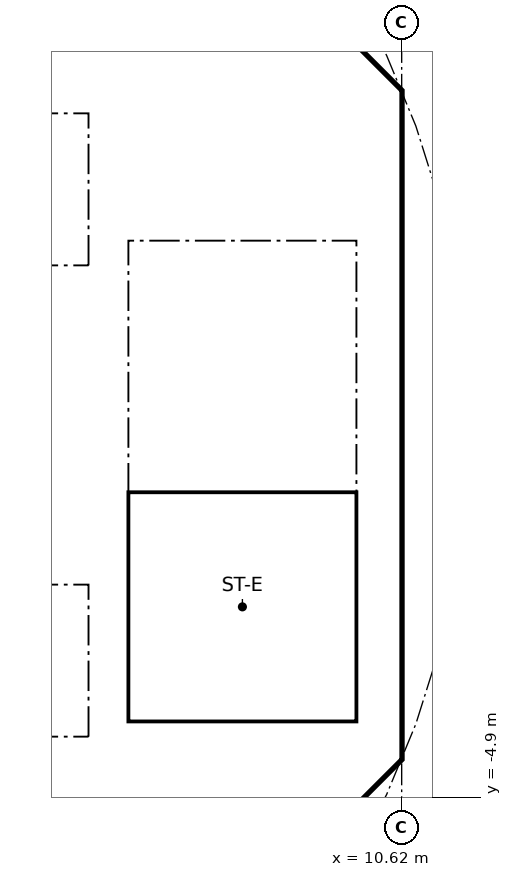
"""IFC4 building model, lengths in metres.
Left out: names, types, materials, properties, quantities, classifications, styles, units other than length and angle.
Written with IfcOpenShell. Run it as: python <this file> out.ifc"""

import sys

from ifc_helpers import new_model, si_unit, direction, frame, frame_2d, origin, place, context, subcontext, project, spatial, polyline, rectangle, outline, extrude, element, fill, save


model = new_model("IFC4")
c1 = context("Model", 3, precision=1e-05, world=origin(), true_north=direction((0.0, 1.0)))
c2 = subcontext(c1, "Body", "Model", "MODEL_VIEW")
j1 = project(units=[si_unit("LENGTHUNIT", "METRE"), si_unit("PLANEANGLEUNIT", "RADIAN")], contexts=[c1])
p1 = place(None, origin())
s1 = spatial("IfcSite", under=j1, at=p1, CompositionType="ELEMENT")
p2 = place(p1, origin())
s2 = spatial("IfcBuilding", under=s1, at=p2, CompositionType="ELEMENT")
p3 = place(p2, frame((0.0, 0.0, 320.4)))
s3 = spatial("IfcBuildingStorey", under=s2, at=p3, CompositionType="ELEMENT", Elevation=320.4)
p4 = place(p3, frame((9.988, 4.613, 0.0), z_axis=(0.0, 0.0, 1.0), x_axis=(-0.707106781187, 0.707106781187, 0.0)))
e1 = element("IfcWall", 1, at=p4, inside=s3, PredefinedType="SHEAR", context=c2, shape_type="SweptSolid", body=[
    extrude(rectangle(XDim=7.602, YDim=0.6, at=frame_2d((3.801, 0.0))), origin(), (0.0, 0.0, 1.0), 4.2),
])
p5 = place(p4, frame((3.201, 0.0, 0.0)))
e2 = element("IfcOpeningElement", 2, at=p5, cuts=e1, PredefinedType="OPENING", context=c2, shape_type="SweptSolid", body=[
    extrude(rectangle(XDim=1.2, YDim=2.1, at=frame_2d((0.6, 1.05))), frame((0.0, 0.31, 0.0), z_axis=(0.0, -1.0, 0.0), x_axis=(1.0, 0.0, 0.0)), (0.0, 0.0, 1.0), 0.62),
])
p6 = place(p3, frame((4.613, -9.988, 0.0), z_axis=(0.0, 0.0, 1.0), x_axis=(0.707106781187, 0.707106781187, 0.0)))
e3 = element("IfcWall", 3, at=p6, inside=s3, PredefinedType="SHEAR", context=c2, shape_type="SweptSolid", body=[
    extrude(rectangle(XDim=7.602, YDim=0.6, at=frame_2d((3.801, 0.0))), origin(), (0.0, 0.0, 1.0), 4.2),
])
p7 = place(p6, frame((3.201, 0.0, 0.0)))
e4 = element("IfcOpeningElement", 4, at=p7, cuts=e3, PredefinedType="OPENING", context=c2, shape_type="SweptSolid", body=[
    extrude(rectangle(XDim=1.2, YDim=2.1, at=frame_2d((0.6, 1.05))), frame((0.0, 0.31, 0.0), z_axis=(0.0, -1.0, 0.0), x_axis=(1.0, 0.0, 0.0)), (0.0, 0.0, 1.0), 0.62),
])
p8 = place(p3, frame((-6.7, 2.0, 0.0), z_axis=(0.0, 0.0, 1.0), x_axis=(1.0, 0.0, 0.0)))
e5 = element("IfcWall", 5, at=p8, inside=s3, PredefinedType="SOLIDWALL", context=c2, shape_type="SweptSolid", body=[
    extrude(rectangle(XDim=13.4, YDim=0.2, at=frame_2d((6.7, 0.0))), origin(), (0.0, 0.0, 1.0), 4.2),
])
p9 = place(p8, frame((11.65, 0.0, 0.0)))
e6 = element("IfcOpeningElement", 6, at=p9, cuts=e5, PredefinedType="OPENING", context=c2, shape_type="SweptSolid", body=[
    extrude(rectangle(XDim=1.1, YDim=2.1, at=frame_2d((0.55, 1.05))), frame((0.0, 0.11, 0.0), z_axis=(0.0, -1.0, 0.0), x_axis=(1.0, 0.0, 0.0)), (0.0, 0.0, 1.0), 0.22),
])
p10 = place(p8, frame((1.85, 0.0, 0.0)))
e7 = element("IfcOpeningElement", 7, at=p10, cuts=e5, PredefinedType="OPENING", context=c2, shape_type="SweptSolid", body=[
    extrude(rectangle(XDim=0.9, YDim=2.1, at=frame_2d((0.45, 1.05))), frame((0.0, 0.11, 0.0), z_axis=(0.0, -1.0, 0.0), x_axis=(1.0, 0.0, 0.0)), (0.0, 0.0, 1.0), 0.22),
])
p11 = place(p8, frame((5.15, 0.0, 0.0)))
e8 = element("IfcOpeningElement", 8, at=p11, cuts=e5, PredefinedType="OPENING", context=c2, shape_type="SweptSolid", body=[
    extrude(rectangle(XDim=0.9, YDim=2.1, at=frame_2d((0.45, 1.05))), frame((0.0, 0.11, 0.0), z_axis=(0.0, -1.0, 0.0), x_axis=(1.0, 0.0, 0.0)), (0.0, 0.0, 1.0), 0.22),
])
p12 = place(p8, frame((8.45, 0.0, 0.0)))
e9 = element("IfcOpeningElement", 9, at=p12, cuts=e5, PredefinedType="OPENING", context=c2, shape_type="SweptSolid", body=[
    extrude(rectangle(XDim=0.9, YDim=2.1, at=frame_2d((0.45, 1.05))), frame((0.0, 0.11, 0.0), z_axis=(0.0, -1.0, 0.0), x_axis=(1.0, 0.0, 0.0)), (0.0, 0.0, 1.0), 0.22),
])
p13 = place(p3, frame((6.7, 4.0, 0.0), z_axis=(0.0, 0.0, 1.0), x_axis=(1.0, 0.0, 0.0)))
e10 = element("IfcWall", 10, at=p13, inside=s3, PredefinedType="SOLIDWALL", context=c2, shape_type="SweptSolid", body=[
    extrude(rectangle(XDim=3.325, YDim=0.2, at=frame_2d((1.662, 0.0))), origin(), (0.0, 0.0, 1.0), 4.2),
])
p14 = place(p13, frame((1.25, 0.0, 0.0)))
e11 = element("IfcOpeningElement", 11, at=p14, cuts=e10, PredefinedType="OPENING", context=c2, shape_type="SweptSolid", body=[
    extrude(rectangle(XDim=1.1, YDim=2.1, at=frame_2d((0.55, 1.05))), frame((0.0, 0.11, 0.0), z_axis=(0.0, -1.0, 0.0), x_axis=(1.0, 0.0, 0.0)), (0.0, 0.0, 1.0), 0.22),
])
p15 = place(p3, frame((-6.7, -2.0, 0.0), z_axis=(0.0, 0.0, 1.0), x_axis=(1.0, 0.0, 0.0)))
e12 = element("IfcWall", 12, at=p15, inside=s3, PredefinedType="SOLIDWALL", context=c2, shape_type="SweptSolid", body=[
    extrude(rectangle(XDim=13.4, YDim=0.2, at=frame_2d((6.7, 0.0))), origin(), (0.0, 0.0, 1.0), 4.2),
])
p16 = place(p15, frame((9.45, 0.0, 0.0)))
e13 = element("IfcOpeningElement", 13, at=p16, cuts=e12, PredefinedType="OPENING", context=c2, shape_type="SweptSolid", body=[
    extrude(rectangle(XDim=1.1, YDim=2.1, at=frame_2d((0.55, 1.05))), frame((0.0, 0.11, 0.0), z_axis=(0.0, -1.0, 0.0), x_axis=(1.0, 0.0, 0.0)), (0.0, 0.0, 1.0), 0.22),
])
p17 = place(p15, frame((11.65, 0.0, 0.0)))
e14 = element("IfcOpeningElement", 14, at=p17, cuts=e12, PredefinedType="OPENING", context=c2, shape_type="SweptSolid", body=[
    extrude(rectangle(XDim=1.1, YDim=2.1, at=frame_2d((0.55, 1.05))), frame((0.0, 0.11, 0.0), z_axis=(0.0, -1.0, 0.0), x_axis=(1.0, 0.0, 0.0)), (0.0, 0.0, 1.0), 0.22),
])
p18 = place(p15, frame((1.85, 0.0, 0.0)))
e15 = element("IfcOpeningElement", 15, at=p18, cuts=e12, PredefinedType="OPENING", context=c2, shape_type="SweptSolid", body=[
    extrude(rectangle(XDim=0.9, YDim=2.1, at=frame_2d((0.45, 1.05))), frame((0.0, 0.11, 0.0), z_axis=(0.0, -1.0, 0.0), x_axis=(1.0, 0.0, 0.0)), (0.0, 0.0, 1.0), 0.22),
])
p19 = place(p15, frame((5.15, 0.0, 0.0)))
e16 = element("IfcOpeningElement", 16, at=p19, cuts=e12, PredefinedType="OPENING", context=c2, shape_type="SweptSolid", body=[
    extrude(rectangle(XDim=0.9, YDim=2.1, at=frame_2d((0.45, 1.05))), frame((0.0, 0.11, 0.0), z_axis=(0.0, -1.0, 0.0), x_axis=(1.0, 0.0, 0.0)), (0.0, 0.0, 1.0), 0.22),
])
p20 = place(p15, frame((7.35, 0.0, 0.0)))
e17 = element("IfcOpeningElement", 17, at=p20, cuts=e12, PredefinedType="OPENING", context=c2, shape_type="SweptSolid", body=[
    extrude(rectangle(XDim=0.9, YDim=2.1, at=frame_2d((0.45, 1.05))), frame((0.0, 0.11, 0.0), z_axis=(0.0, -1.0, 0.0), x_axis=(1.0, 0.0, 0.0)), (0.0, 0.0, 1.0), 0.22),
])
p21 = place(p3, origin())
e18 = element("IfcWall", 18, at=p21, inside=s3, PredefinedType="SHEAR", context=c2, shape_type="SweptSolid", body=[
    extrude(outline(polyline([(9.776, -4.401), (10.025, -4.152), (10.025, -3.801), (10.025, 4.152), (9.776, 4.401), (10.2, 4.825), (10.625, 4.401), (10.625, -4.401), (10.2, -4.825), (9.776, -4.401)])), origin(), (0.0, 0.0, 1.0), 4.2),
])
p22 = place(p3, origin())
e19 = element("IfcWall", 19, at=p22, inside=s3, PredefinedType="SOLIDWALL", context=c2, shape_type="SweptSolid", body=[
    extrude(outline(polyline([(-6.7, 4.3), (6.7, 4.3), (6.7, 2.1), (6.5, 2.1), (6.5, 4.1), (4.5, 4.1), (4.5, 2.1), (4.3, 2.1), (4.3, 4.1), (0.1, 4.1), (0.1, 2.1), (-0.1, 2.1), (-0.1, 4.1), (-2.1, 4.1), (-2.1, 2.1), (-2.3, 2.1), (-2.3, 4.1), (-6.5, 4.1), (-6.5, 2.1), (-6.7, 2.1), (-6.7, 4.3)])), origin(), (0.0, 0.0, 1.0), 4.2),
])
p23 = place(p3, origin())
e20 = element("IfcWall", 20, at=p23, inside=s3, PredefinedType="SOLIDWALL", context=c2, shape_type="SweptSolid", body=[
    extrude(outline(polyline([(-6.7, -2.1), (-6.5, -2.1), (-6.5, -4.1), (-2.3, -4.1), (-2.3, -2.1), (-2.1, -2.1), (-2.1, -4.1), (-0.1, -4.1), (-0.1, -2.1), (0.1, -2.1), (0.1, -4.1), (2.1, -4.1), (2.1, -2.1), (2.3, -2.1), (2.3, -4.1), (4.3, -4.1), (4.3, -2.1), (4.5, -2.1), (4.5, -4.1), (6.5, -4.1), (6.5, -2.1), (6.7, -2.1), (6.7, -4.3), (-6.7, -4.3), (-6.7, -2.1)])), origin(), (0.0, 0.0, 1.0), 4.2),
])
p24 = place(p3, origin())
e21 = element("IfcWall", 21, at=p24, inside=s3, PredefinedType="SOLIDWALL", context=c2, shape_type="SweptSolid", body=[
    extrude(outline(polyline([(7.025, -3.9), (6.7, -3.9), (6.7, 3.9), (7.025, 3.9), (7.025, -3.9)])), origin(), (0.0, 0.0, 1.0), 4.2),
])
p25 = place(p3, origin())
e22 = element("IfcWall", 22, at=p25, inside=s3, PredefinedType="SOLIDWALL", context=c2, shape_type="SweptSolid", body=[
    extrude(outline(polyline([(10.025, -4.1), (6.7, -4.1), (6.7, -3.9), (10.025, -3.9), (10.025, -4.1)])), origin(), (0.0, 0.0, 1.0), 4.2),
])
p26 = place(p3, frame((5.077, 12.0, 0.0), z_axis=(0.0, 0.0, 1.0), x_axis=(0.707106781187, -0.707106781187, 0.0)))
e23 = element("IfcWall", 23, at=p26, inside=s3, PredefinedType="PARTITIONING", context=c2, shape_type="SweptSolid", body=[
    extrude(rectangle(XDim=10.003, YDim=0.15, at=frame_2d((5.001, 0.0))), origin(), (0.0, 0.0, 1.0), 4.2),
])
p27 = place(p26, frame((4.295, 0.0, 0.0)))
e24 = element("IfcOpeningElement", 24, at=p27, cuts=e23, PredefinedType="OPENING", context=c2, shape_type="SweptSolid", body=[
    extrude(rectangle(XDim=1.2, YDim=2.1, at=frame_2d((0.6, 1.05))), frame((0.0, 0.085, 0.0), z_axis=(0.0, -1.0, 0.0), x_axis=(1.0, 0.0, 0.0)), (0.0, 0.0, 1.0), 0.17),
])
p28 = place(p3, frame((12.15, -4.926, 0.0), z_axis=(0.0, 0.0, 1.0), x_axis=(-0.707057968072, -0.707155590932, 0.0)))
e25 = element("IfcWall", 25, at=p28, inside=s3, PredefinedType="PARTITIONING", context=c2, shape_type="SweptSolid", body=[
    extrude(rectangle(XDim=10.003, YDim=0.15, at=frame_2d((5.002, 0.0))), origin(), (0.0, 0.0, 1.0), 4.2),
])
p29 = place(p28, frame((4.658, 0.0, 0.0)))
e26 = element("IfcOpeningElement", 26, at=p29, cuts=e25, PredefinedType="OPENING", context=c2, shape_type="SweptSolid", body=[
    extrude(rectangle(XDim=0.9, YDim=2.1, at=frame_2d((0.45, 1.05))), frame((0.0, 0.085, 0.0), z_axis=(0.0, -1.0, 0.0), x_axis=(1.0, 0.0, 0.0)), (0.0, 0.0, 1.0), 0.17),
])
p30 = place(p9, origin())
e27 = element("IfcDoor", 27, at=p30, inside=s3, OperationType="DOUBLE_DOOR_SLIDING", PredefinedType="DOOR", context=c2, shape_type="SweptSolid", body=[
    extrude(rectangle(XDim=1.1, YDim=2.1, at=frame_2d((0.55, 1.05))), frame((0.0, 0.025, 0.0), z_axis=(0.0, -1.0, 0.0), x_axis=(1.0, 0.0, 0.0)), (0.0, 0.0, 1.0), 0.05),
])
fill(e6, e27)
p31 = place(p17, origin())
e28 = element("IfcDoor", 28, at=p31, inside=s3, OperationType="DOUBLE_DOOR_SLIDING", PredefinedType="DOOR", context=c2, shape_type="SweptSolid", body=[
    extrude(rectangle(XDim=1.1, YDim=2.1, at=frame_2d((0.55, 1.05))), frame((0.0, 0.025, 0.0), z_axis=(0.0, -1.0, 0.0), x_axis=(1.0, 0.0, 0.0)), (0.0, 0.0, 1.0), 0.05),
])
fill(e14, e28)
p32 = place(p14, frame((1.1, 0.0, 0.0), x_axis=(-1.0, 0.0, 0.0)))
e29 = element("IfcDoor", 29, at=p32, inside=s3, OperationType="SINGLE_SWING_RIGHT", PredefinedType="DOOR", context=c2, shape_type="SweptSolid", body=[
    extrude(rectangle(XDim=1.1, YDim=2.1, at=frame_2d((0.55, 1.05))), frame((0.0, 0.025, 0.0), z_axis=(0.0, -1.0, 0.0), x_axis=(1.0, 0.0, 0.0)), (0.0, 0.0, 1.0), 0.05),
])
fill(e11, e29)
save(model, sys.argv[1])
